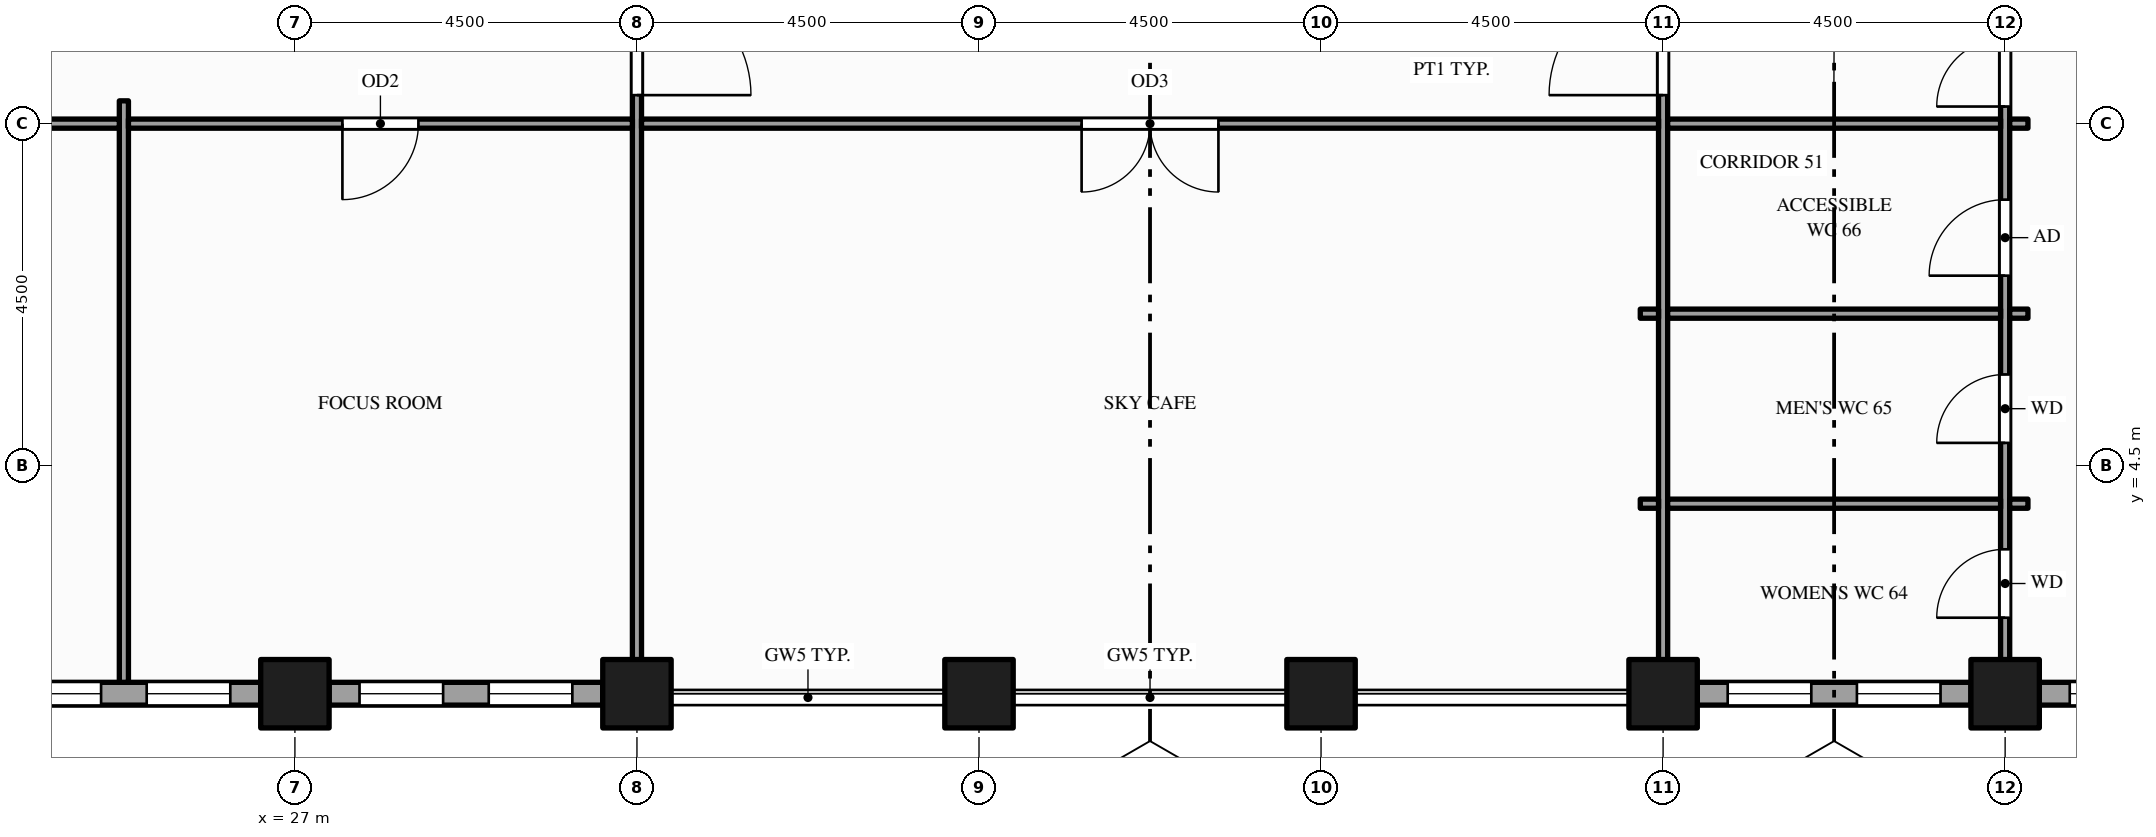
"""IFC4 building model, lengths in metres.
Left out: names, types, materials, properties, quantities, classifications, styles, units other than length and angle.
Written with IfcOpenShell. Run it as: python <this file> out.ifc"""

import sys

from ifc_helpers import new_model, si_unit, direction, frame, frame_2d, origin, origin_2d, place, context, subcontext, project, spatial, rectangle, hollow_rectangle, extrude, element, fill, save


model = new_model("IFC4")
c1 = context("Model", 3, precision=1e-05, world=origin(), true_north=direction((0.0, 1.0)))
c2 = subcontext(c1, "Body", "Model", "MODEL_VIEW")
j1 = project(units=[si_unit("LENGTHUNIT", "METRE"), si_unit("PLANEANGLEUNIT", "RADIAN")], contexts=[c1])
p1 = place(None, origin())
s1 = spatial("IfcSite", under=j1, at=p1, CompositionType="ELEMENT")
p2 = place(p1, origin())
s2 = spatial("IfcBuilding", under=s1, at=p2, CompositionType="ELEMENT")
p3 = place(p2, frame((0.0, 0.0, 151.0)))
s3 = spatial("IfcBuildingStorey", under=s2, at=p3, CompositionType="ELEMENT", Elevation=151.0)
for number, where, z_axis, x_axis in (
    (1, (27.0, 1.5, -0.15), (0.0, 0.0, 1.0), (1.0, 0.0, 0.0)),
    (2, (31.5, 1.5, -0.15), (0.0, 0.0, 1.0), (1.0, 0.0, 0.0)),
    (3, (36.0, 1.5, -0.15), (0.0, 0.0, 1.0), (1.0, 0.0, 0.0)),
    (4, (40.5, 1.5, -0.15), (0.0, 0.0, 1.0), (1.0, 0.0, 0.0)),
    (5, (45.0, 1.5, -0.15), (0.0, 0.0, 1.0), (1.0, 0.0, 0.0)),
    (6, (49.5, 1.5, -0.15), (0.0, 0.0, 1.0), (1.0, 0.0, 0.0)),
):
    element("IfcColumn", number, at=place(p3, frame(where, z_axis=z_axis, x_axis=x_axis)), inside=s3, PredefinedType="COLUMN", context=c2, shape_type="SweptSolid", body=[
        extrude(hollow_rectangle(XDim=0.9, YDim=0.9, WallThickness=0.045, at=origin_2d()), origin(), (0.0, 0.0, 1.0), 4.0),
    ])
p4 = place(p3, frame((22.95, 1.5, 0.0), z_axis=(0.0, 0.0, 1.0), x_axis=(1.0, 0.0, 0.0)))
e7 = element("IfcWall", 7, at=p4, inside=s3, PredefinedType="STANDARD", context=c2, shape_type="SweptSolid", body=[
    extrude(rectangle(XDim=3.6, YDim=0.3, at=frame_2d((1.8, 0.0))), origin(), (0.0, 0.0, 1.0), 2.87),
])
p5 = place(p4, frame((0.4, 0.0, 0.9)))
e8 = element("IfcOpeningElement", 8, at=p5, cuts=e7, PredefinedType="OPENING", context=c2, shape_type="SweptSolid", body=[
    extrude(rectangle(XDim=1.1, YDim=1.75, at=frame_2d((0.55, 0.875))), frame((0.0, 0.16, 0.0), z_axis=(0.0, -1.0, 0.0), x_axis=(1.0, 0.0, 0.0)), (0.0, 0.0, 1.0), 0.32),
])
p6 = place(p4, frame((2.1, 0.0, 0.9)))
e9 = element("IfcOpeningElement", 9, at=p6, cuts=e7, PredefinedType="OPENING", context=c2, shape_type="SweptSolid", body=[
    extrude(rectangle(XDim=1.1, YDim=1.75, at=frame_2d((0.55, 0.875))), frame((0.0, 0.16, 0.0), z_axis=(0.0, -1.0, 0.0), x_axis=(1.0, 0.0, 0.0)), (0.0, 0.0, 1.0), 0.32),
])
p7 = place(p3, frame((27.45, 1.5, 0.0), z_axis=(0.0, 0.0, 1.0), x_axis=(1.0, 0.0, 0.0)))
e10 = element("IfcWall", 10, at=p7, inside=s3, PredefinedType="STANDARD", context=c2, shape_type="SweptSolid", body=[
    extrude(rectangle(XDim=3.6, YDim=0.3, at=frame_2d((1.8, 0.0))), origin(), (0.0, 0.0, 1.0), 2.87),
])
p8 = place(p7, frame((0.4, 0.0, 0.9)))
e11 = element("IfcOpeningElement", 11, at=p8, cuts=e10, PredefinedType="OPENING", context=c2, shape_type="SweptSolid", body=[
    extrude(rectangle(XDim=1.1, YDim=1.75, at=frame_2d((0.55, 0.875))), frame((0.0, 0.16, 0.0), z_axis=(0.0, -1.0, 0.0), x_axis=(1.0, 0.0, 0.0)), (0.0, 0.0, 1.0), 0.32),
])
p9 = place(p7, frame((2.1, 0.0, 0.9)))
e12 = element("IfcOpeningElement", 12, at=p9, cuts=e10, PredefinedType="OPENING", context=c2, shape_type="SweptSolid", body=[
    extrude(rectangle(XDim=1.1, YDim=1.75, at=frame_2d((0.55, 0.875))), frame((0.0, 0.16, 0.0), z_axis=(0.0, -1.0, 0.0), x_axis=(1.0, 0.0, 0.0)), (0.0, 0.0, 1.0), 0.32),
])
p10 = place(p3, frame((45.45, 1.5, 0.0), z_axis=(0.0, 0.0, 1.0), x_axis=(1.0, 0.0, 0.0)))
e13 = element("IfcWall", 13, at=p10, inside=s3, PredefinedType="STANDARD", context=c2, shape_type="SweptSolid", body=[
    extrude(rectangle(XDim=3.6, YDim=0.3, at=frame_2d((1.8, 0.0))), origin(), (0.0, 0.0, 1.0), 2.87),
])
p11 = place(p10, frame((0.4, 0.0, 0.9)))
e14 = element("IfcOpeningElement", 14, at=p11, cuts=e13, PredefinedType="OPENING", context=c2, shape_type="SweptSolid", body=[
    extrude(rectangle(XDim=1.1, YDim=1.75, at=frame_2d((0.55, 0.875))), frame((0.0, 0.16, 0.0), z_axis=(0.0, -1.0, 0.0), x_axis=(1.0, 0.0, 0.0)), (0.0, 0.0, 1.0), 0.32),
])
p12 = place(p10, frame((2.1, 0.0, 0.9)))
e15 = element("IfcOpeningElement", 15, at=p12, cuts=e13, PredefinedType="OPENING", context=c2, shape_type="SweptSolid", body=[
    extrude(rectangle(XDim=1.1, YDim=1.75, at=frame_2d((0.55, 0.875))), frame((0.0, 0.16, 0.0), z_axis=(0.0, -1.0, 0.0), x_axis=(1.0, 0.0, 0.0)), (0.0, 0.0, 1.0), 0.32),
])
p13 = place(p3, frame((49.95, 1.5, 0.0), z_axis=(0.0, 0.0, 1.0), x_axis=(1.0, 0.0, 0.0)))
e16 = element("IfcWall", 16, at=p13, inside=s3, PredefinedType="STANDARD", context=c2, shape_type="SweptSolid", body=[
    extrude(rectangle(XDim=4.05, YDim=0.3, at=frame_2d((2.025, 0.0))), origin(), (0.0, 0.0, 1.0), 2.87),
])
p14 = place(p13, frame((0.4, 0.0, 0.9)))
e17 = element("IfcOpeningElement", 17, at=p14, cuts=e16, PredefinedType="OPENING", context=c2, shape_type="SweptSolid", body=[
    extrude(rectangle(XDim=1.1, YDim=1.75, at=frame_2d((0.55, 0.875))), frame((0.0, 0.16, 0.0), z_axis=(0.0, -1.0, 0.0), x_axis=(1.0, 0.0, 0.0)), (0.0, 0.0, 1.0), 0.32),
])
p15 = place(p13, frame((2.1, 0.0, 0.9)))
e18 = element("IfcOpeningElement", 18, at=p15, cuts=e16, PredefinedType="OPENING", context=c2, shape_type="SweptSolid", body=[
    extrude(rectangle(XDim=1.55, YDim=1.75, at=frame_2d((0.775, 0.875))), frame((0.0, 0.16, 0.0), z_axis=(0.0, -1.0, 0.0), x_axis=(1.0, 0.0, 0.0)), (0.0, 0.0, 1.0), 0.32),
])
p16 = place(p3, frame((24.75, 1.65, 0.0), z_axis=(0.0, 0.0, 1.0), x_axis=(0.0, 1.0, 0.0)))
e19 = element("IfcWall", 19, at=p16, inside=s3, PredefinedType="PARTITIONING", context=c2, shape_type="SweptSolid", body=[
    extrude(rectangle(XDim=7.65, YDim=0.12, at=frame_2d((3.825, 0.0))), origin(), (0.0, 0.0, 1.0), 2.87),
])
p17 = place(p3, frame((31.5, 1.65, 0.0), z_axis=(0.0, 0.0, 1.0), x_axis=(0.0, 1.0, 0.0)))
e20 = element("IfcWall", 20, at=p17, inside=s3, PredefinedType="PARTITIONING", context=c2, shape_type="SweptSolid", body=[
    extrude(rectangle(XDim=22.2, YDim=0.12, at=frame_2d((11.1, 0.0))), origin(), (0.0, 0.0, 1.0), 2.87),
])
p18 = place(p17, frame((7.725, 0.0, 0.0)))
e21 = element("IfcOpeningElement", 21, at=p18, cuts=e20, PredefinedType="OPENING", context=c2, shape_type="SweptSolid", body=[
    extrude(rectangle(XDim=1.5, YDim=2.1, at=frame_2d((0.75, 1.05))), frame((0.0, 0.07, 0.0), z_axis=(0.0, -1.0, 0.0), x_axis=(1.0, 0.0, 0.0)), (0.0, 0.0, 1.0), 0.14),
])
p19 = place(p3, frame((45.0, 1.65, 0.0), z_axis=(0.0, 0.0, 1.0), x_axis=(0.0, 1.0, 0.0)))
e22 = element("IfcWall", 22, at=p19, inside=s3, PredefinedType="PARTITIONING", context=c2, shape_type="SweptSolid", body=[
    extrude(rectangle(XDim=22.2, YDim=0.12, at=frame_2d((11.1, 0.0))), origin(), (0.0, 0.0, 1.0), 2.87),
])
p20 = place(p19, frame((7.725, 0.0, 0.0)))
e23 = element("IfcOpeningElement", 23, at=p20, cuts=e22, PredefinedType="OPENING", context=c2, shape_type="SweptSolid", body=[
    extrude(rectangle(XDim=1.5, YDim=2.1, at=frame_2d((0.75, 1.05))), frame((0.0, 0.07, 0.0), z_axis=(0.0, -1.0, 0.0), x_axis=(1.0, 0.0, 0.0)), (0.0, 0.0, 1.0), 0.14),
])
p21 = place(p3, frame((49.5, 1.65, 0.0), z_axis=(0.0, 0.0, 1.0), x_axis=(0.0, 1.0, 0.0)))
e24 = element("IfcWall", 24, at=p21, inside=s3, PredefinedType="PARTITIONING", context=c2, shape_type="SweptSolid", body=[
    extrude(rectangle(XDim=22.2, YDim=0.12, at=frame_2d((11.1, 0.0))), origin(), (0.0, 0.0, 1.0), 2.87),
])
p22 = place(p21, frame((7.575, 0.0, 0.0)))
e25 = element("IfcOpeningElement", 25, at=p22, cuts=e24, PredefinedType="OPENING", context=c2, shape_type="SweptSolid", body=[
    extrude(rectangle(XDim=1.8, YDim=2.1, at=frame_2d((0.9, 1.05))), frame((0.0, 0.07, 0.0), z_axis=(0.0, -1.0, 0.0), x_axis=(1.0, 0.0, 0.0)), (0.0, 0.0, 1.0), 0.14),
])
p23 = place(p21, frame((0.85, 0.0, 0.0)))
e26 = element("IfcOpeningElement", 26, at=p23, cuts=e24, PredefinedType="OPENING", context=c2, shape_type="SweptSolid", body=[
    extrude(rectangle(XDim=0.9, YDim=2.1, at=frame_2d((0.45, 1.05))), frame((0.0, 0.07, 0.0), z_axis=(0.0, -1.0, 0.0), x_axis=(1.0, 0.0, 0.0)), (0.0, 0.0, 1.0), 0.14),
])
p24 = place(p21, frame((3.15, 0.0, 0.0)))
e27 = element("IfcOpeningElement", 27, at=p24, cuts=e24, PredefinedType="OPENING", context=c2, shape_type="SweptSolid", body=[
    extrude(rectangle(XDim=0.9, YDim=2.1, at=frame_2d((0.45, 1.05))), frame((0.0, 0.07, 0.0), z_axis=(0.0, -1.0, 0.0), x_axis=(1.0, 0.0, 0.0)), (0.0, 0.0, 1.0), 0.14),
])
p25 = place(p21, frame((5.35, 0.0, 0.0)))
e28 = element("IfcOpeningElement", 28, at=p25, cuts=e24, PredefinedType="OPENING", context=c2, shape_type="SweptSolid", body=[
    extrude(rectangle(XDim=1.0, YDim=2.1, at=frame_2d((0.5, 1.05))), frame((0.0, 0.07, 0.0), z_axis=(0.0, -1.0, 0.0), x_axis=(1.0, 0.0, 0.0)), (0.0, 0.0, 1.0), 0.14),
])
p26 = place(p3, frame((44.7, 4.0, 0.0), z_axis=(0.0, 0.0, 1.0), x_axis=(1.0, 0.0, 0.0)))
e29 = element("IfcWall", 29, at=p26, inside=s3, PredefinedType="PARTITIONING", context=c2, shape_type="SweptSolid", body=[
    extrude(rectangle(XDim=0.24, YDim=0.12, at=frame_2d((0.12, 0.0))), origin(), (0.0, 0.0, 1.0), 2.87),
])
p27 = place(p3, frame((45.06, 4.0, 0.0), z_axis=(0.0, 0.0, 1.0), x_axis=(1.0, 0.0, 0.0)))
e30 = element("IfcWall", 30, at=p27, inside=s3, PredefinedType="PARTITIONING", context=c2, shape_type="SweptSolid", body=[
    extrude(rectangle(XDim=4.38, YDim=0.12, at=frame_2d((2.19, 0.0))), origin(), (0.0, 0.0, 1.0), 2.87),
])
for number, where, z_axis, x_axis in (
    (31, (49.56, 4.0, 0.0), (0.0, 0.0, 1.0), (1.0, 0.0, 0.0)),
    (32, (44.7, 6.5, 0.0), (0.0, 0.0, 1.0), (1.0, 0.0, 0.0)),
):
    element("IfcWall", number, at=place(p3, frame(where, z_axis=z_axis, x_axis=x_axis)), inside=s3, PredefinedType="PARTITIONING", context=c2, shape_type="SweptSolid", body=[
        extrude(rectangle(XDim=0.24, YDim=0.12, at=frame_2d((0.12, 0.0))), origin(), (0.0, 0.0, 1.0), 2.87),
    ])
p28 = place(p3, frame((45.06, 6.5, 0.0), z_axis=(0.0, 0.0, 1.0), x_axis=(1.0, 0.0, 0.0)))
e33 = element("IfcWall", 33, at=p28, inside=s3, PredefinedType="PARTITIONING", context=c2, shape_type="SweptSolid", body=[
    extrude(rectangle(XDim=4.38, YDim=0.12, at=frame_2d((2.19, 0.0))), origin(), (0.0, 0.0, 1.0), 2.87),
])
p29 = place(p3, frame((49.56, 6.5, 0.0), z_axis=(0.0, 0.0, 1.0), x_axis=(1.0, 0.0, 0.0)))
e34 = element("IfcWall", 34, at=p29, inside=s3, PredefinedType="PARTITIONING", context=c2, shape_type="SweptSolid", body=[
    extrude(rectangle(XDim=0.24, YDim=0.12, at=frame_2d((0.12, 0.0))), origin(), (0.0, 0.0, 1.0), 2.87),
])
p30 = place(p3, frame((20.31, 9.0, 0.0), z_axis=(0.0, 0.0, 1.0), x_axis=(1.0, 0.0, 0.0)))
e35 = element("IfcWall", 35, at=p30, inside=s3, PredefinedType="PARTITIONING", context=c2, shape_type="SweptSolid", body=[
    extrude(rectangle(XDim=4.38, YDim=0.12, at=frame_2d((2.19, 0.0))), origin(), (0.0, 0.0, 1.0), 2.87),
])
p31 = place(p30, frame((1.69, 0.0, 0.0)))
e36 = element("IfcOpeningElement", 36, at=p31, cuts=e35, PredefinedType="OPENING", context=c2, shape_type="SweptSolid", body=[
    extrude(rectangle(XDim=1.0, YDim=2.1, at=frame_2d((0.5, 1.05))), frame((0.0, 0.07, 0.0), z_axis=(0.0, -1.0, 0.0), x_axis=(1.0, 0.0, 0.0)), (0.0, 0.0, 1.0), 0.14),
])
p32 = place(p3, frame((24.81, 9.0, 0.0), z_axis=(0.0, 0.0, 1.0), x_axis=(1.0, 0.0, 0.0)))
e37 = element("IfcWall", 37, at=p32, inside=s3, PredefinedType="PARTITIONING", context=c2, shape_type="SweptSolid", body=[
    extrude(rectangle(XDim=6.63, YDim=0.12, at=frame_2d((3.315, 0.0))), origin(), (0.0, 0.0, 1.0), 2.87),
])
p33 = place(p32, frame((2.815, 0.0, 0.0)))
e38 = element("IfcOpeningElement", 38, at=p33, cuts=e37, PredefinedType="OPENING", context=c2, shape_type="SweptSolid", body=[
    extrude(rectangle(XDim=1.0, YDim=2.1, at=frame_2d((0.5, 1.05))), frame((0.0, 0.07, 0.0), z_axis=(0.0, -1.0, 0.0), x_axis=(1.0, 0.0, 0.0)), (0.0, 0.0, 1.0), 0.14),
])
p34 = place(p3, frame((31.56, 9.0, 0.0), z_axis=(0.0, 0.0, 1.0), x_axis=(1.0, 0.0, 0.0)))
e39 = element("IfcWall", 39, at=p34, inside=s3, PredefinedType="PARTITIONING", context=c2, shape_type="SweptSolid", body=[
    extrude(rectangle(XDim=13.38, YDim=0.12, at=frame_2d((6.69, 0.0))), origin(), (0.0, 0.0, 1.0), 2.87),
])
p35 = place(p34, frame((5.79, 0.0, 0.0)))
e40 = element("IfcOpeningElement", 40, at=p35, cuts=e39, PredefinedType="OPENING", context=c2, shape_type="SweptSolid", body=[
    extrude(rectangle(XDim=1.8, YDim=2.1, at=frame_2d((0.9, 1.05))), frame((0.0, 0.07, 0.0), z_axis=(0.0, -1.0, 0.0), x_axis=(1.0, 0.0, 0.0)), (0.0, 0.0, 1.0), 0.14),
])
p36 = place(p3, frame((45.06, 9.0, 0.0), z_axis=(0.0, 0.0, 1.0), x_axis=(1.0, 0.0, 0.0)))
e41 = element("IfcWall", 41, at=p36, inside=s3, PredefinedType="PARTITIONING", context=c2, shape_type="SweptSolid", body=[
    extrude(rectangle(XDim=4.38, YDim=0.12, at=frame_2d((2.19, 0.0))), origin(), (0.0, 0.0, 1.0), 2.87),
])
p37 = place(p3, frame((49.56, 9.0, 0.0), z_axis=(0.0, 0.0, 1.0), x_axis=(1.0, 0.0, 0.0)))
e42 = element("IfcWall", 42, at=p37, inside=s3, PredefinedType="PARTITIONING", context=c2, shape_type="SweptSolid", body=[
    extrude(rectangle(XDim=0.24, YDim=0.12, at=frame_2d((0.12, 0.0))), origin(), (0.0, 0.0, 1.0), 2.87),
])
p38 = place(p5, origin())
e43 = element("IfcWindow", 43, at=p38, inside=s3, PartitioningType="SINGLE_PANEL", PredefinedType="WINDOW", context=c2, shape_type="SweptSolid", body=[
    extrude(rectangle(XDim=1.1, YDim=1.75, at=frame_2d((0.55, 0.875))), frame((0.0, 0.03, 0.0), z_axis=(0.0, -1.0, 0.0), x_axis=(1.0, 0.0, 0.0)), (0.0, 0.0, 1.0), 0.06),
])
fill(e8, e43)
p39 = place(p6, origin())
e44 = element("IfcWindow", 44, at=p39, inside=s3, PartitioningType="SINGLE_PANEL", PredefinedType="WINDOW", context=c2, shape_type="SweptSolid", body=[
    extrude(rectangle(XDim=1.1, YDim=1.75, at=frame_2d((0.55, 0.875))), frame((0.0, 0.03, 0.0), z_axis=(0.0, -1.0, 0.0), x_axis=(1.0, 0.0, 0.0)), (0.0, 0.0, 1.0), 0.06),
])
fill(e9, e44)
p40 = place(p8, origin())
e45 = element("IfcWindow", 45, at=p40, inside=s3, PartitioningType="SINGLE_PANEL", PredefinedType="WINDOW", context=c2, shape_type="SweptSolid", body=[
    extrude(rectangle(XDim=1.1, YDim=1.75, at=frame_2d((0.55, 0.875))), frame((0.0, 0.03, 0.0), z_axis=(0.0, -1.0, 0.0), x_axis=(1.0, 0.0, 0.0)), (0.0, 0.0, 1.0), 0.06),
])
fill(e11, e45)
p41 = place(p9, origin())
e46 = element("IfcWindow", 46, at=p41, inside=s3, PartitioningType="SINGLE_PANEL", PredefinedType="WINDOW", context=c2, shape_type="SweptSolid", body=[
    extrude(rectangle(XDim=1.1, YDim=1.75, at=frame_2d((0.55, 0.875))), frame((0.0, 0.03, 0.0), z_axis=(0.0, -1.0, 0.0), x_axis=(1.0, 0.0, 0.0)), (0.0, 0.0, 1.0), 0.06),
])
fill(e12, e46)
p42 = place(p11, origin())
e47 = element("IfcWindow", 47, at=p42, inside=s3, PartitioningType="SINGLE_PANEL", PredefinedType="WINDOW", context=c2, shape_type="SweptSolid", body=[
    extrude(rectangle(XDim=1.1, YDim=1.75, at=frame_2d((0.55, 0.875))), frame((0.0, 0.03, 0.0), z_axis=(0.0, -1.0, 0.0), x_axis=(1.0, 0.0, 0.0)), (0.0, 0.0, 1.0), 0.06),
])
fill(e14, e47)
p43 = place(p12, origin())
e48 = element("IfcWindow", 48, at=p43, inside=s3, PartitioningType="SINGLE_PANEL", PredefinedType="WINDOW", context=c2, shape_type="SweptSolid", body=[
    extrude(rectangle(XDim=1.1, YDim=1.75, at=frame_2d((0.55, 0.875))), frame((0.0, 0.03, 0.0), z_axis=(0.0, -1.0, 0.0), x_axis=(1.0, 0.0, 0.0)), (0.0, 0.0, 1.0), 0.06),
])
fill(e15, e48)
p44 = place(p14, origin())
e49 = element("IfcWindow", 49, at=p44, inside=s3, PartitioningType="SINGLE_PANEL", PredefinedType="WINDOW", context=c2, shape_type="SweptSolid", body=[
    extrude(rectangle(XDim=1.1, YDim=1.75, at=frame_2d((0.55, 0.875))), frame((0.0, 0.03, 0.0), z_axis=(0.0, -1.0, 0.0), x_axis=(1.0, 0.0, 0.0)), (0.0, 0.0, 1.0), 0.06),
])
fill(e17, e49)
p45 = place(p18, origin())
e50 = element("IfcDoor", 50, at=p45, inside=s3, OperationType="SINGLE_SWING_LEFT", PredefinedType="DOOR", context=c2, shape_type="SweptSolid", body=[
    extrude(rectangle(XDim=1.5, YDim=2.1, at=frame_2d((0.75, 1.05))), frame((0.0, 0.025, 0.0), z_axis=(0.0, -1.0, 0.0), x_axis=(1.0, 0.0, 0.0)), (0.0, 0.0, 1.0), 0.05),
])
fill(e21, e50)
p46 = place(p20, origin())
e51 = element("IfcDoor", 51, at=p46, inside=s3, OperationType="SINGLE_SWING_LEFT", PredefinedType="DOOR", context=c2, shape_type="SweptSolid", body=[
    extrude(rectangle(XDim=1.5, YDim=2.1, at=frame_2d((0.75, 1.05))), frame((0.0, 0.025, 0.0), z_axis=(0.0, -1.0, 0.0), x_axis=(1.0, 0.0, 0.0)), (0.0, 0.0, 1.0), 0.05),
])
fill(e23, e51)
p47 = place(p22, origin())
e52 = element("IfcDoor", 52, at=p47, inside=s3, OperationType="DOUBLE_DOOR_SINGLE_SWING", PredefinedType="DOOR", context=c2, shape_type="SweptSolid", body=[
    extrude(rectangle(XDim=1.8, YDim=2.1, at=frame_2d((0.9, 1.05))), frame((0.0, 0.025, 0.0), z_axis=(0.0, -1.0, 0.0), x_axis=(1.0, 0.0, 0.0)), (0.0, 0.0, 1.0), 0.05),
])
fill(e25, e52)
p48 = place(p33, origin())
e53 = element("IfcDoor", 53, at=p48, inside=s3, OperationType="SINGLE_SWING_LEFT", PredefinedType="DOOR", context=c2, shape_type="SweptSolid", body=[
    extrude(rectangle(XDim=1.0, YDim=2.1, at=frame_2d((0.5, 1.05))), frame((0.0, 0.025, 0.0), z_axis=(0.0, -1.0, 0.0), x_axis=(1.0, 0.0, 0.0)), (0.0, 0.0, 1.0), 0.05),
])
fill(e38, e53)
p49 = place(p35, origin())
e54 = element("IfcDoor", 54, at=p49, inside=s3, OperationType="DOUBLE_DOOR_SINGLE_SWING", PredefinedType="DOOR", context=c2, shape_type="SweptSolid", body=[
    extrude(rectangle(XDim=1.8, YDim=2.1, at=frame_2d((0.9, 1.05))), frame((0.0, 0.025, 0.0), z_axis=(0.0, -1.0, 0.0), x_axis=(1.0, 0.0, 0.0)), (0.0, 0.0, 1.0), 0.05),
])
fill(e40, e54)
p50 = place(p23, origin())
e55 = element("IfcDoor", 55, at=p50, inside=s3, OperationType="SINGLE_SWING_LEFT", PredefinedType="DOOR", context=c2, shape_type="SweptSolid", body=[
    extrude(rectangle(XDim=0.9, YDim=2.1, at=frame_2d((0.45, 1.05))), frame((0.0, 0.025, 0.0), z_axis=(0.0, -1.0, 0.0), x_axis=(1.0, 0.0, 0.0)), (0.0, 0.0, 1.0), 0.05),
])
fill(e26, e55)
p51 = place(p24, origin())
e56 = element("IfcDoor", 56, at=p51, inside=s3, OperationType="SINGLE_SWING_LEFT", PredefinedType="DOOR", context=c2, shape_type="SweptSolid", body=[
    extrude(rectangle(XDim=0.9, YDim=2.1, at=frame_2d((0.45, 1.05))), frame((0.0, 0.025, 0.0), z_axis=(0.0, -1.0, 0.0), x_axis=(1.0, 0.0, 0.0)), (0.0, 0.0, 1.0), 0.05),
])
fill(e27, e56)
p52 = place(p25, origin())
e57 = element("IfcDoor", 57, at=p52, inside=s3, OperationType="SINGLE_SWING_LEFT", PredefinedType="DOOR", context=c2, shape_type="SweptSolid", body=[
    extrude(rectangle(XDim=1.0, YDim=2.1, at=frame_2d((0.5, 1.05))), frame((0.0, 0.025, 0.0), z_axis=(0.0, -1.0, 0.0), x_axis=(1.0, 0.0, 0.0)), (0.0, 0.0, 1.0), 0.05),
])
fill(e28, e57)
save(model, sys.argv[1])
